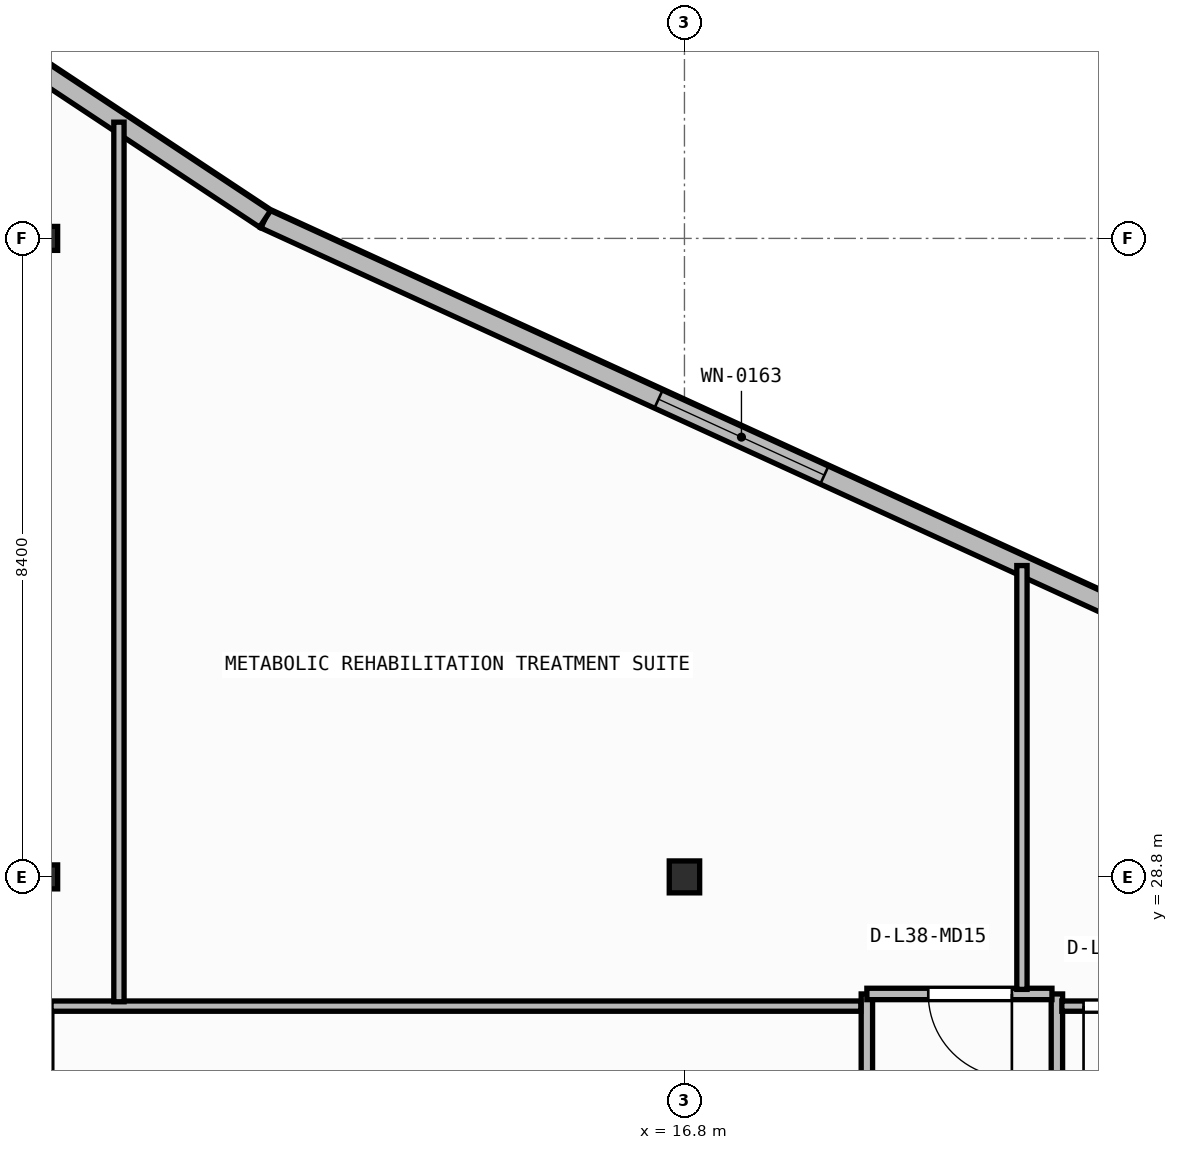
"""IFC4 building model, lengths in metres.
Left out: names, types, materials, properties, quantities, classifications, styles, units other than length and angle.
Written with IfcOpenShell. Run it as: python <this file> out.ifc"""

import sys

from ifc_helpers import new_model, si_unit, direction, frame, frame_2d, origin, origin_2d, place, context, subcontext, project, spatial, rectangle, i_section, extrude, element, fill, save


model = new_model("IFC4")
c1 = context("Model", 3, precision=1e-05, world=origin(), true_north=direction((0.0, 1.0)))
c2 = subcontext(c1, "Body", "Model", "MODEL_VIEW")
j1 = project(units=[si_unit("LENGTHUNIT", "METRE"), si_unit("PLANEANGLEUNIT", "RADIAN")], contexts=[c1])
p1 = place(None, origin())
s1 = spatial("IfcSite", under=j1, at=p1, CompositionType="ELEMENT")
p2 = place(p1, origin())
s2 = spatial("IfcBuilding", under=s1, at=p2, CompositionType="ELEMENT")
p3 = place(p2, frame((0.0, 0.0, 154.7)))
s3 = spatial("IfcBuildingStorey", under=s2, at=p3, CompositionType="ELEMENT", Elevation=154.7)
p4 = place(p3, frame((8.4, 28.8, 0.0), z_axis=(0.0, 0.0, 1.0), x_axis=(1.0, 0.0, 0.0)))
e1 = element("IfcColumn", 1, at=p4, inside=s3, PredefinedType="COLUMN", context=c2, shape_type="SweptSolid", body=[
    extrude(i_section(OverallWidth=0.307, OverallDepth=0.315, WebThickness=0.012, FlangeThickness=0.019, FilletRadius=0.017, at=origin_2d()), origin(), (0.0, 0.0, 1.0), 3.95),
])
p5 = place(p3, frame((16.8, 28.8, 0.0), z_axis=(0.0, 0.0, 1.0), x_axis=(1.0, 0.0, 0.0)))
e2 = element("IfcColumn", 2, at=p5, inside=s3, PredefinedType="COLUMN", context=c2, shape_type="SweptSolid", body=[
    extrude(i_section(OverallWidth=0.4, OverallDepth=0.42, WebThickness=0.025, FlangeThickness=0.04, at=origin_2d()), origin(), (0.0, 0.0, 1.0), 3.95),
])
p6 = place(p3, frame((8.4, 37.2, 0.0), z_axis=(0.0, 0.0, 1.0), x_axis=(1.0, 0.0, 0.0)))
e3 = element("IfcColumn", 3, at=p6, inside=s3, PredefinedType="COLUMN", context=c2, shape_type="SweptSolid", body=[
    extrude(i_section(OverallWidth=0.307, OverallDepth=0.315, WebThickness=0.012, FlangeThickness=0.019, FilletRadius=0.017, at=origin_2d()), origin(), (0.0, 0.0, 1.0), 3.95),
])
p7 = place(p3, frame((23.818, 31.716, 0.0), z_axis=(0.0, 0.0, 1.0), x_axis=(-0.909209527513, 0.416338846471, 0.0)))
e4 = element("IfcWall", 4, at=p7, inside=s3, PredefinedType="STANDARD", context=c2, shape_type="SweptSolid", body=[
    extrude(rectangle(XDim=13.787, YDim=0.26, at=frame_2d((6.894, 0.0))), origin(), (0.0, 0.0, 1.0), 3.71),
])
p8 = place(p7, frame((5.694, 0.0, 0.9)))
e5 = element("IfcOpeningElement", 5, at=p8, cuts=e4, PredefinedType="OPENING", context=c2, shape_type="SweptSolid", body=[
    extrude(rectangle(XDim=2.4, YDim=1.65, at=frame_2d((1.2, 0.825))), frame((0.0, 0.14, 0.0), z_axis=(0.0, -1.0, 0.0), x_axis=(1.0, 0.0, 0.0)), (0.0, 0.0, 1.0), 0.28),
])
p9 = place(p3, frame((11.282, 37.456, 0.0), z_axis=(0.0, 0.0, 1.0), x_axis=(-0.833630474253, 0.552322580017, 0.0)))
e6 = element("IfcWall", 6, at=p9, inside=s3, PredefinedType="STANDARD", context=c2, shape_type="SweptSolid", body=[
    extrude(rectangle(XDim=10.223, YDim=0.26, at=frame_2d((5.111, 0.0))), origin(), (0.0, 0.0, 1.0), 3.71),
])
p10 = place(p9, frame((3.911, 0.0, 0.9)))
e7 = element("IfcOpeningElement", 7, at=p10, cuts=e6, PredefinedType="OPENING", context=c2, shape_type="SweptSolid", body=[
    extrude(rectangle(XDim=2.4, YDim=1.65, at=frame_2d((1.2, 0.825))), frame((0.0, 0.14, 0.0), z_axis=(0.0, -1.0, 0.0), x_axis=(1.0, 0.0, 0.0)), (0.0, 0.0, 1.0), 0.28),
])
p11 = place(p3, frame((19.2, 27.26, 0.0), z_axis=(0.0, 0.0, 1.0), x_axis=(0.0, -1.0, 0.0)))
e8 = element("IfcWall", 8, at=p11, inside=s3, PredefinedType="PARTITIONING", context=c2, shape_type="SweptSolid", body=[
    extrude(rectangle(XDim=6.482, YDim=0.15, at=frame_2d((3.241, 0.0))), origin(), (0.0, 0.0, 1.0), 3.71),
])
p12 = place(p11, frame((2.068, 0.0, 0.0)))
e9 = element("IfcOpeningElement", 9, at=p12, cuts=e8, PredefinedType="OPENING", context=c2, shape_type="SweptSolid", body=[
    extrude(rectangle(XDim=1.1, YDim=2.1, at=frame_2d((0.55, 1.05))), frame((0.0, 0.085, 0.0), z_axis=(0.0, -1.0, 0.0), x_axis=(1.0, 0.0, 0.0)), (0.0, 0.0, 1.0), 0.17),
])
p13 = place(p3, frame((21.7, 20.504, 0.0), z_axis=(0.0, 0.0, 1.0), x_axis=(0.0, 1.0, 0.0)))
e10 = element("IfcWall", 10, at=p13, inside=s3, PredefinedType="PARTITIONING", context=c2, shape_type="SweptSolid", body=[
    extrude(rectangle(XDim=6.756, YDim=0.15, at=frame_2d((3.378, 0.0))), origin(), (0.0, 0.0, 1.0), 3.71),
])
p14 = place(p13, frame((2.828, 0.0, 0.0)))
e11 = element("IfcOpeningElement", 11, at=p14, cuts=e10, PredefinedType="OPENING", context=c2, shape_type="SweptSolid", body=[
    extrude(rectangle(XDim=1.1, YDim=2.1, at=frame_2d((0.55, 1.05))), frame((0.0, 0.085, 0.0), z_axis=(0.0, -1.0, 0.0), x_axis=(1.0, 0.0, 0.0)), (0.0, 0.0, 1.0), 0.17),
])
p15 = place(p3, frame((21.635, 27.26, 0.0), z_axis=(0.0, 0.0, 1.0), x_axis=(-1.0, 0.0, 0.0)))
e12 = element("IfcWall", 12, at=p15, inside=s3, PredefinedType="PARTITIONING", context=c2, shape_type="SweptSolid", body=[
    extrude(rectangle(XDim=2.435, YDim=0.15, at=frame_2d((1.218, 0.0))), origin(), (0.0, 0.0, 1.0), 3.71),
])
p16 = place(p15, frame((0.527, 0.0, 0.0)))
e13 = element("IfcOpeningElement", 13, at=p16, cuts=e12, PredefinedType="OPENING", context=c2, shape_type="SweptSolid", body=[
    extrude(rectangle(XDim=1.1, YDim=2.1, at=frame_2d((0.55, 1.05))), frame((0.0, 0.085, 0.0), z_axis=(0.0, -1.0, 0.0), x_axis=(1.0, 0.0, 0.0)), (0.0, 0.0, 1.0), 0.17),
])
p17 = place(p3, frame((19.12, 27.1, 0.0), z_axis=(0.0, 0.0, 1.0), x_axis=(-1.0, 0.0, 0.0)))
e14 = element("IfcWall", 14, at=p17, inside=s3, PredefinedType="PARTITIONING", context=c2, shape_type="SweptSolid", body=[
    extrude(rectangle(XDim=10.653, YDim=0.135, at=frame_2d((5.326, 0.0))), origin(), (0.0, 0.0, 1.0), 3.71),
])
p18 = place(p3, frame((26.69, 27.1, 0.0), z_axis=(0.0, 0.0, 1.0), x_axis=(-1.0, 0.0, 0.0)))
e15 = element("IfcWall", 15, at=p18, inside=s3, PredefinedType="PARTITIONING", context=c2, shape_type="SweptSolid", body=[
    extrude(rectangle(XDim=4.925, YDim=0.135, at=frame_2d((2.462, 0.0))), origin(), (0.0, 0.0, 1.0), 3.71),
])
p19 = place(p18, frame((3.539, 0.0, 0.0)))
e16 = element("IfcOpeningElement", 16, at=p19, cuts=e15, PredefinedType="OPENING", context=c2, shape_type="SweptSolid", body=[
    extrude(rectangle(XDim=1.1, YDim=2.1, at=frame_2d((0.55, 1.05))), frame((0.0, 0.077, 0.0), z_axis=(0.0, -1.0, 0.0), x_axis=(1.0, 0.0, 0.0)), (0.0, 0.0, 1.0), 0.155),
])
p20 = place(p3, frame((9.36, 27.157, 0.0), z_axis=(0.0, 0.0, 1.0), x_axis=(0.0, 1.0, 0.0)))
e17 = element("IfcWall", 17, at=p20, inside=s3, PredefinedType="PARTITIONING", context=c2, shape_type="SweptSolid", body=[
    extrude(rectangle(XDim=11.572, YDim=0.135, at=frame_2d((5.786, 0.0))), origin(), (0.0, 0.0, 1.0), 3.71),
])
p21 = place(p3, frame((21.24, 27.32, 0.0), z_axis=(0.0, 0.0, 1.0), x_axis=(0.0, 1.0, 0.0)))
e18 = element("IfcWall", 18, at=p21, inside=s3, PredefinedType="PARTITIONING", context=c2, shape_type="SweptSolid", body=[
    extrude(rectangle(XDim=5.576, YDim=0.135, at=frame_2d((2.788, 0.0))), origin(), (0.0, 0.0, 1.0), 3.71),
])
p22 = place(p8, origin())
e19 = element("IfcWindow", 19, at=p22, inside=s3, PartitioningType="SINGLE_PANEL", PredefinedType="WINDOW", context=c2, shape_type="SweptSolid", body=[
    extrude(rectangle(XDim=2.4, YDim=1.65, at=frame_2d((1.2, 0.825))), frame((0.0, 0.03, 0.0), z_axis=(0.0, -1.0, 0.0), x_axis=(1.0, 0.0, 0.0)), (0.0, 0.0, 1.0), 0.06),
])
fill(e5, e19)
p23 = place(p16, origin())
e20 = element("IfcDoor", 20, at=p23, inside=s3, OperationType="SINGLE_SWING_LEFT", PredefinedType="DOOR", context=c2, shape_type="SweptSolid", body=[
    extrude(rectangle(XDim=1.1, YDim=2.1, at=frame_2d((0.55, 1.05))), frame((0.0, 0.025, 0.0), z_axis=(0.0, -1.0, 0.0), x_axis=(1.0, 0.0, 0.0)), (0.0, 0.0, 1.0), 0.05),
])
fill(e13, e20)
p24 = place(p19, origin())
e21 = element("IfcDoor", 21, at=p24, inside=s3, OperationType="SINGLE_SWING_RIGHT", PredefinedType="DOOR", context=c2, shape_type="SweptSolid", body=[
    extrude(rectangle(XDim=1.1, YDim=2.1, at=frame_2d((0.55, 1.05))), frame((0.0, 0.025, 0.0), z_axis=(0.0, -1.0, 0.0), x_axis=(1.0, 0.0, 0.0)), (0.0, 0.0, 1.0), 0.05),
])
fill(e16, e21)
save(model, sys.argv[1])
